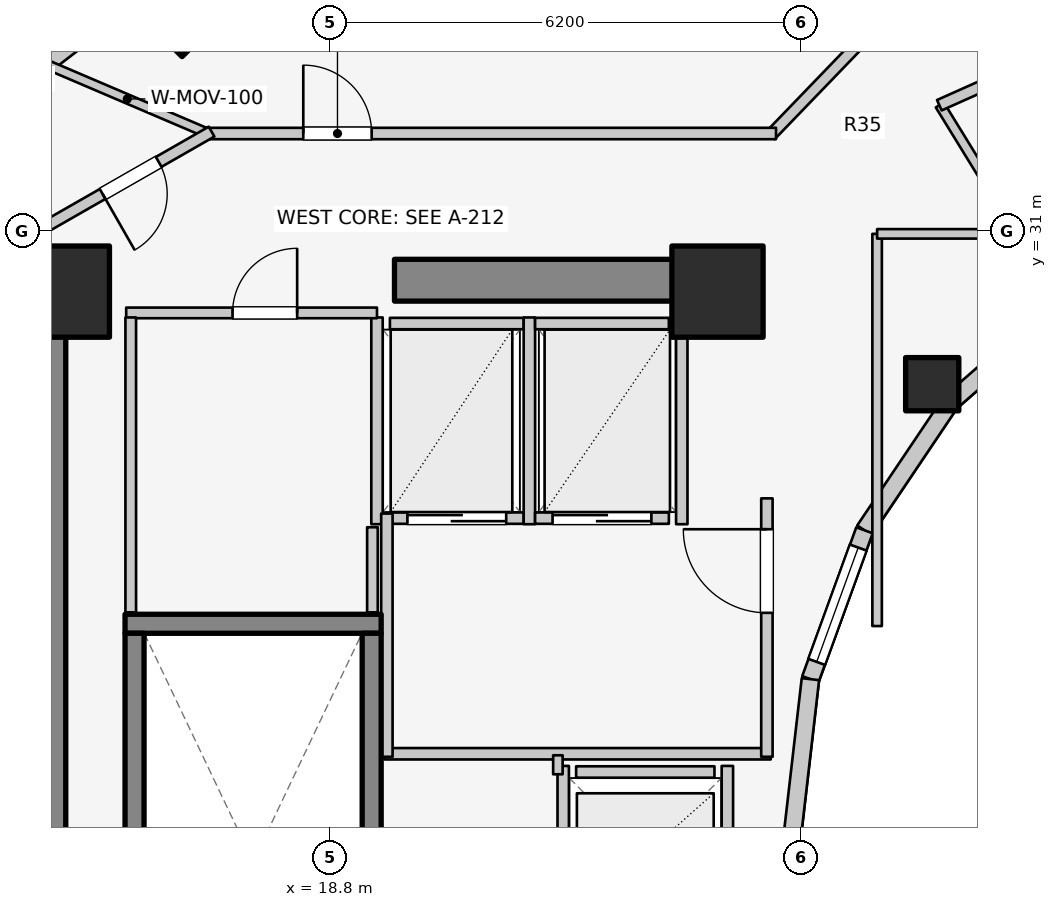
"""IFC4 building model, lengths in metres.
Left out: names, types, materials, properties, quantities, classifications, styles, units other than length and angle.
Written with IfcOpenShell. Run it as: python <this file> out.ifc"""

import sys

from ifc_helpers import new_model, si_unit, direction, frame, frame_2d, origin, origin_2d, place, context, subcontext, project, spatial, rectangle, extrude, element, fill, save


model = new_model("IFC4")
c1 = context("Model", 3, precision=1e-05, world=origin(), true_north=direction((0.0, 1.0)))
c2 = subcontext(c1, "Body", "Model", "MODEL_VIEW")
j1 = project(units=[si_unit("LENGTHUNIT", "METRE"), si_unit("PLANEANGLEUNIT", "RADIAN")], contexts=[c1])
p1 = place(None, origin())
s1 = spatial("IfcSite", under=j1, at=p1, CompositionType="ELEMENT")
p2 = place(p1, origin())
s2 = spatial("IfcBuilding", under=s1, at=p2, CompositionType="ELEMENT")
p3 = place(p2, frame((0.0, 0.0, 210.9)))
s3 = spatial("IfcBuildingStorey", under=s2, at=p3, CompositionType="ELEMENT", Elevation=210.9)
p4 = place(p3, frame((15.05, 17.05, 0.0), z_axis=(0.0, 0.0, 1.0), x_axis=(0.0, 1.0, 0.0)))
e1 = element("IfcWall", 1, at=p4, inside=s3, PredefinedType="SHEAR", context=c2, shape_type="SweptSolid", body=[
    extrude(rectangle(XDim=12.8, YDim=0.55, at=frame_2d((6.4, 0.0))), origin(), (0.0, 0.0, 1.0), 3.1),
])
p5 = place(p3, frame((19.65, 30.35, 0.0), z_axis=(0.0, 0.0, 1.0), x_axis=(1.0, 0.0, 0.0)))
e2 = element("IfcWall", 2, at=p5, inside=s3, PredefinedType="SHEAR", context=c2, shape_type="SweptSolid", body=[
    extrude(rectangle(XDim=4.5, YDim=0.55, at=frame_2d((2.25, 0.0))), origin(), (0.0, 0.0, 1.0), 3.1),
])
p6 = place(p3, frame((16.105, 25.83, 0.0), z_axis=(0.0, 0.0, 1.0), x_axis=(1.0, 0.0, 0.0)))
e3 = element("IfcWall", 3, at=p6, inside=s3, PredefinedType="SOLIDWALL", context=c2, shape_type="SweptSolid", body=[
    extrude(rectangle(XDim=3.37, YDim=0.25, at=frame_2d((1.685, 0.0))), origin(), (0.0, 0.0, 1.0), 3.1),
])
for number, where, z_axis, x_axis in (
    (4, (16.23, 17.895, 0.0), (0.0, 0.0, 1.0), (0.0, 1.0, 0.0)),
    (5, (19.35, 17.895, 0.0), (0.0, 0.0, 1.0), (0.0, 1.0, 0.0)),
):
    element("IfcWall", number, at=place(p3, frame(where, z_axis=z_axis, x_axis=x_axis)), inside=s3, PredefinedType="SOLIDWALL", context=c2, shape_type="SweptSolid", body=[
        extrude(rectangle(XDim=7.81, YDim=0.25, at=frame_2d((3.905, 0.0))), origin(), (0.0, 0.0, 1.0), 3.1),
    ])
for number, where, z_axis, x_axis in (
    (6, (23.9, 30.2, 0.0), (0.0, 0.0, 1.0), (1.0, 0.0, 0.0)),
    (7, (15.3, 30.2, 0.0), (0.0, 0.0, 1.0), (1.0, 0.0, 0.0)),
):
    element("IfcColumn", number, at=place(p3, frame(where, z_axis=z_axis, x_axis=x_axis)), inside=s3, PredefinedType="COLUMN", context=c2, shape_type="SweptSolid", body=[
        extrude(rectangle(XDim=1.2, YDim=1.2, at=origin_2d()), origin(), (0.0, 0.0, 1.0), 3.1),
    ])
p7 = place(p3, frame((26.725, 28.982, 0.0), z_axis=(0.0, 0.0, 1.0), x_axis=(1.0, 0.0, 0.0)))
e8 = element("IfcColumn", 8, at=p7, inside=s3, PredefinedType="COLUMN", context=c2, shape_type="SweptSolid", body=[
    extrude(rectangle(XDim=0.7, YDim=0.7, at=origin_2d()), origin(), (0.0, 0.0, 1.0), 3.1),
])
p8 = place(p3, frame((16.855, 33.857, 0.0), z_axis=(0.0, 0.0, 1.0), x_axis=(-0.707106781187, 0.707106781187, 0.0)))
e9 = element("IfcColumn", 9, at=p8, inside=s3, PredefinedType="COLUMN", context=c2, shape_type="SweptSolid", body=[
    extrude(rectangle(XDim=0.8, YDim=0.8, at=origin_2d()), origin(), (0.0, 0.0, 1.0), 3.1),
])
p9 = place(p3, frame((28.44, 30.032, 0.0), z_axis=(0.0, 0.0, 1.0), x_axis=(-0.752576694707, -0.658504607869, 0.0)))
e10 = element("IfcWall", 10, at=p9, inside=s3, PredefinedType="STANDARD", context=c2, shape_type="SweptSolid", body=[
    extrude(rectangle(XDim=1.959, YDim=0.23, at=frame_2d((0.98, 0.0))), origin(), (0.0, 0.0, 1.0), 2.16),
])
p10 = place(p3, frame((26.965, 28.742, 0.0), z_axis=(0.0, 0.0, 1.0), x_axis=(-0.558197800898, -0.829707909492, 0.0)))
e11 = element("IfcWall", 11, at=p10, inside=s3, PredefinedType="STANDARD", context=c2, shape_type="SweptSolid", body=[
    extrude(rectangle(XDim=2.027, YDim=0.23, at=frame_2d((1.013, 0.0))), origin(), (0.0, 0.0, 1.0), 2.16),
])
p11 = place(p3, frame((25.834, 27.06, 0.0), z_axis=(0.0, 0.0, 1.0), x_axis=(-0.341423187295, -0.93990968033, 0.0)))
e12 = element("IfcWall", 12, at=p11, inside=s3, PredefinedType="STANDARD", context=c2, shape_type="SweptSolid", body=[
    extrude(rectangle(XDim=2.084, YDim=0.23, at=frame_2d((1.042, 0.0))), origin(), (0.0, 0.0, 1.0), 2.84),
])
p12 = place(p11, frame((0.242, 0.0, 0.85)))
e13 = element("IfcOpeningElement", 13, at=p12, cuts=e12, PredefinedType="OPENING", context=c2, shape_type="SweptSolid", body=[
    extrude(rectangle(XDim=1.6, YDim=1.65, at=frame_2d((0.8, 0.825))), frame((0.0, 0.125, 0.0), z_axis=(0.0, -1.0, 0.0), x_axis=(1.0, 0.0, 0.0)), (0.0, 0.0, 1.0), 0.25),
])
p13 = place(p3, frame((25.123, 25.102, 0.0), z_axis=(0.0, 0.0, 1.0), x_axis=(-0.114711713601, -0.993398823617, 0.0)))
e14 = element("IfcWall", 14, at=p13, inside=s3, PredefinedType="STANDARD", context=c2, shape_type="SweptSolid", body=[
    extrude(rectangle(XDim=2.115, YDim=0.23, at=frame_2d((1.058, 0.0))), origin(), (0.0, 0.0, 1.0), 2.84),
])
p14 = place(p3, frame((16.442, 34.272, 0.0), z_axis=(0.0, 0.0, 1.0), x_axis=(-0.792713817907, -0.609593965603, 0.0)))
e15 = element("IfcWall", 15, at=p14, inside=s3, PredefinedType="STANDARD", context=c2, shape_type="SweptSolid", body=[
    extrude(rectangle(XDim=4.041, YDim=0.26, at=frame_2d((2.021, 0.0))), origin(), (0.0, 0.0, 1.0), 2.85),
])
p15 = place(p14, frame((2.275, 0.0, 0.75)))
e16 = element("IfcOpeningElement", 16, at=p15, cuts=e15, PredefinedType="OPENING", context=c2, shape_type="SweptSolid", body=[
    extrude(rectangle(XDim=1.2, YDim=1.5, at=frame_2d((0.6, 0.75))), frame((0.0, 0.14, 0.0), z_axis=(0.0, -1.0, 0.0), x_axis=(1.0, 0.0, 0.0)), (0.0, 0.0, 1.0), 0.28),
])
p16 = place(p3, frame((22.04, 23.88, 0.0), z_axis=(0.0, 0.0, 1.0), x_axis=(1.0, 0.0, 0.0)))
e17 = element("IfcWall", 17, at=p16, inside=s3, PredefinedType="SOLIDWALL", context=c2, shape_type="SweptSolid", body=[
    extrude(rectangle(XDim=1.82, YDim=0.15, at=frame_2d((0.91, 0.0))), origin(), (0.0, 0.0, 1.0), 2.12),
])
p17 = place(p3, frame((21.87, 21.64, 0.0), z_axis=(0.0, 0.0, 1.0), x_axis=(0.0, 1.0, 0.0)))
e18 = element("IfcWall", 18, at=p17, inside=s3, PredefinedType="SOLIDWALL", context=c2, shape_type="SweptSolid", body=[
    extrude(rectangle(XDim=2.32, YDim=0.15, at=frame_2d((1.16, 0.0))), origin(), (0.0, 0.0, 1.0), 2.855),
])
p18 = place(p3, frame((24.03, 21.64, 0.0), z_axis=(0.0, 0.0, 1.0), x_axis=(0.0, 1.0, 0.0)))
e19 = element("IfcWall", 19, at=p18, inside=s3, PredefinedType="SOLIDWALL", context=c2, shape_type="SweptSolid", body=[
    extrude(rectangle(XDim=2.32, YDim=0.15, at=frame_2d((1.16, 0.0))), origin(), (0.0, 0.0, 1.0), 2.12),
])
p19 = place(p3, frame((19.59, 27.22, 0.0), z_axis=(0.0, 0.0, 1.0), x_axis=(1.0, 0.0, 0.0)))
e20 = element("IfcWall", 20, at=p19, inside=s3, PredefinedType="SOLIDWALL", context=c2, shape_type="SweptSolid", body=[
    extrude(rectangle(XDim=1.76, YDim=0.15, at=frame_2d((0.88, 0.0))), origin(), (0.0, 0.0, 1.0), 2.855),
])
p20 = place(p19, frame((0.23, 0.0, 0.0)))
e21 = element("IfcOpeningElement", 21, at=p20, cuts=e20, PredefinedType="OPENING", context=c2, shape_type="SweptSolid", body=[
    extrude(rectangle(XDim=1.3, YDim=2.1, at=frame_2d((0.65, 1.05))), frame((0.0, 0.085, 0.0), z_axis=(0.0, -1.0, 0.0), x_axis=(1.0, 0.0, 0.0)), (0.0, 0.0, 1.0), 0.17),
])
p21 = place(p3, frame((19.59, 29.78, 0.0), z_axis=(0.0, 0.0, 1.0), x_axis=(1.0, 0.0, 0.0)))
e22 = element("IfcWall", 22, at=p21, inside=s3, PredefinedType="SOLIDWALL", context=c2, shape_type="SweptSolid", body=[
    extrude(rectangle(XDim=1.76, YDim=0.15, at=frame_2d((0.88, 0.0))), origin(), (0.0, 0.0, 1.0), 2.855),
])
for number, where, z_axis, x_axis in (
    (23, (19.42, 27.14, 0.0), (0.0, 0.0, 1.0), (0.0, 1.0, 0.0)),
    (24, (21.425, 27.14, 0.0), (0.0, 0.0, 1.0), (0.0, 1.0, 0.0)),
):
    element("IfcWall", number, at=place(p3, frame(where, z_axis=z_axis, x_axis=x_axis)), inside=s3, PredefinedType="SOLIDWALL", context=c2, shape_type="SweptSolid", body=[
        extrude(rectangle(XDim=2.72, YDim=0.15, at=frame_2d((1.36, 0.0))), origin(), (0.0, 0.0, 1.0), 2.855),
    ])
p22 = place(p3, frame((21.5, 27.22, 0.0), z_axis=(0.0, 0.0, 1.0), x_axis=(1.0, 0.0, 0.0)))
e25 = element("IfcWall", 25, at=p22, inside=s3, PredefinedType="SOLIDWALL", context=c2, shape_type="SweptSolid", body=[
    extrude(rectangle(XDim=1.76, YDim=0.15, at=frame_2d((0.88, 0.0))), origin(), (0.0, 0.0, 1.0), 2.855),
])
p23 = place(p22, frame((0.23, 0.0, 0.0)))
e26 = element("IfcOpeningElement", 26, at=p23, cuts=e25, PredefinedType="OPENING", context=c2, shape_type="SweptSolid", body=[
    extrude(rectangle(XDim=1.3, YDim=2.1, at=frame_2d((0.65, 1.05))), frame((0.0, 0.085, 0.0), z_axis=(0.0, -1.0, 0.0), x_axis=(1.0, 0.0, 0.0)), (0.0, 0.0, 1.0), 0.17),
])
p24 = place(p3, frame((21.5, 29.78, 0.0), z_axis=(0.0, 0.0, 1.0), x_axis=(1.0, 0.0, 0.0)))
e27 = element("IfcWall", 27, at=p24, inside=s3, PredefinedType="SOLIDWALL", context=c2, shape_type="SweptSolid", body=[
    extrude(rectangle(XDim=1.76, YDim=0.15, at=frame_2d((0.88, 0.0))), origin(), (0.0, 0.0, 1.0), 2.855),
])
p25 = place(p3, frame((23.43, 27.14, 0.0), z_axis=(0.0, 0.0, 1.0), x_axis=(0.0, 1.0, 0.0)))
e28 = element("IfcWall", 28, at=p25, inside=s3, PredefinedType="SOLIDWALL", context=c2, shape_type="SweptSolid", body=[
    extrude(rectangle(XDim=2.72, YDim=0.15, at=frame_2d((1.36, 0.0))), origin(), (0.0, 0.0, 1.0), 2.855),
])
p26 = place(p3, frame((19.52, 24.12, 0.0), z_axis=(0.0, 0.0, 1.0), x_axis=(1.0, 0.0, 0.0)))
e29 = element("IfcWall", 29, at=p26, inside=s3, PredefinedType="PARTITIONING", context=c2, shape_type="SweptSolid", body=[
    extrude(rectangle(XDim=5.08, YDim=0.15, at=frame_2d((2.54, 0.0))), origin(), (0.0, 0.0, 1.0), 2.12),
])
p27 = place(p3, frame((19.55, 24.08, 0.0), z_axis=(0.0, 0.0, 1.0), x_axis=(0.0, 1.0, 0.0)))
e30 = element("IfcWall", 30, at=p27, inside=s3, PredefinedType="PARTITIONING", context=c2, shape_type="SweptSolid", body=[
    extrude(rectangle(XDim=3.2, YDim=0.15, at=frame_2d((1.6, 0.0))), origin(), (0.0, 0.0, 1.0), 2.855),
])
p28 = place(p3, frame((24.55, 24.08, 0.0), z_axis=(0.0, 0.0, 1.0), x_axis=(0.0, 1.0, 0.0)))
e31 = element("IfcWall", 31, at=p28, inside=s3, PredefinedType="PARTITIONING", context=c2, shape_type="SweptSolid", body=[
    extrude(rectangle(XDim=3.4, YDim=0.15, at=frame_2d((1.7, 0.0))), origin(), (0.0, 0.0, 1.0), 2.855),
])
p29 = place(p28, frame((1.894, 0.0, 0.0)))
e32 = element("IfcOpeningElement", 32, at=p29, cuts=e31, PredefinedType="OPENING", context=c2, shape_type="SweptSolid", body=[
    extrude(rectangle(XDim=1.1, YDim=2.1, at=frame_2d((0.55, 1.05))), frame((0.0, 0.085, 0.0), z_axis=(0.0, -1.0, 0.0), x_axis=(1.0, 0.0, 0.0)), (0.0, 0.0, 1.0), 0.17),
])
p30 = place(p3, frame((21.8, 23.85, 0.0), z_axis=(0.0, 0.0, 1.0), x_axis=(0.0, 1.0, 0.0)))
e33 = element("IfcWall", 33, at=p30, inside=s3, PredefinedType="PARTITIONING", context=c2, shape_type="SweptSolid", body=[
    extrude(rectangle(XDim=0.25, YDim=0.125, at=frame_2d((0.125, 0.0))), origin(), (0.0, 0.0, 1.0), 2.855),
])
p31 = place(p3, frame((16.12, 29.92, 0.0), z_axis=(0.0, 0.0, 1.0), x_axis=(1.0, 0.0, 0.0)))
e34 = element("IfcWall", 34, at=p31, inside=s3, PredefinedType="PLUMBINGWALL", context=c2, shape_type="SweptSolid", body=[
    extrude(rectangle(XDim=3.3, YDim=0.14, at=frame_2d((1.65, 0.0))), origin(), (0.0, 0.0, 1.0), 2.855),
])
p32 = place(p31, frame((1.399, 0.0, 0.0)))
e35 = element("IfcOpeningElement", 35, at=p32, cuts=e34, PredefinedType="OPENING", context=c2, shape_type="SweptSolid", body=[
    extrude(rectangle(XDim=0.85, YDim=2.05, at=frame_2d((0.425, 1.025))), frame((0.0, 0.08, 0.0), z_axis=(0.0, -1.0, 0.0), x_axis=(1.0, 0.0, 0.0)), (0.0, 0.0, 1.0), 0.16),
])
p33 = place(p3, frame((16.18, 25.98, 0.0), z_axis=(0.0, 0.0, 1.0), x_axis=(0.0, 1.0, 0.0)))
e36 = element("IfcWall", 36, at=p33, inside=s3, PredefinedType="PLUMBINGWALL", context=c2, shape_type="SweptSolid", body=[
    extrude(rectangle(XDim=3.88, YDim=0.14, at=frame_2d((1.94, 0.0))), origin(), (0.0, 0.0, 1.0), 2.855),
])
p34 = place(p3, frame((19.36, 25.98, 0.0), z_axis=(0.0, 0.0, 1.0), x_axis=(0.0, 1.0, 0.0)))
e37 = element("IfcWall", 37, at=p34, inside=s3, PredefinedType="PLUMBINGWALL", context=c2, shape_type="SweptSolid", body=[
    extrude(rectangle(XDim=1.12, YDim=0.14, at=frame_2d((0.56, 0.0))), origin(), (0.0, 0.0, 1.0), 2.855),
])
p35 = place(p3, frame((28.45, 30.015, 0.0), z_axis=(0.0, 0.0, 1.0), x_axis=(-0.523992004803, 0.851723182086, 0.0)))
e38 = element("IfcWall", 38, at=p35, inside=s3, PredefinedType="PARTITIONING", context=c2, shape_type="SweptSolid", body=[
    extrude(rectangle(XDim=3.101, YDim=0.125, at=frame_2d((1.551, 0.0))), origin(), (0.0, 0.0, 1.0), 2.376),
])
p36 = place(p3, frame((29.323, 33.771, 0.0), z_axis=(0.0, 0.0, 1.0), x_axis=(-0.913120130558, -0.407690602257, 0.0)))
e39 = element("IfcWall", 39, at=p36, inside=s3, PredefinedType="PARTITIONING", context=c2, shape_type="SweptSolid", body=[
    extrude(rectangle(XDim=2.743, YDim=0.15, at=frame_2d((1.371, 0.0))), origin(), (0.0, 0.0, 1.0), 2.376),
])
p37 = place(p36, frame((0.896, 0.0, 0.0)))
e40 = element("IfcOpeningElement", 40, at=p37, cuts=e39, PredefinedType="OPENING", context=c2, shape_type="SweptSolid", body=[
    extrude(rectangle(XDim=0.95, YDim=2.1, at=frame_2d((0.475, 1.05))), frame((0.0, 0.085, 0.0), z_axis=(0.0, -1.0, 0.0), x_axis=(1.0, 0.0, 0.0)), (0.0, 0.0, 1.0), 0.17),
])
p38 = place(p3, frame((26.0, 25.8, 0.0), z_axis=(0.0, 0.0, 1.0), x_axis=(0.0, 1.0, 0.0)))
e41 = element("IfcWall", 41, at=p38, inside=s3, PredefinedType="PARTITIONING", context=c2, shape_type="SweptSolid", body=[
    extrude(rectangle(XDim=5.16, YDim=0.125, at=frame_2d((2.58, 0.0))), origin(), (0.0, 0.0, 1.0), 2.232),
])
p39 = place(p3, frame((26.0, 30.96, 0.0), z_axis=(0.0, 0.0, 1.0), x_axis=(1.0, 0.0, 0.0)))
e42 = element("IfcWall", 42, at=p39, inside=s3, PredefinedType="PARTITIONING", context=c2, shape_type="SweptSolid", body=[
    extrude(rectangle(XDim=2.6, YDim=0.125, at=frame_2d((1.3, 0.0))), origin(), (0.0, 0.0, 1.0), 2.376),
])
p40 = place(p3, frame((17.246, 32.26, 0.0), z_axis=(0.0, 0.0, 1.0), x_axis=(-0.919666784939, 0.39269963672, 0.0)))
e43 = element("IfcWall", 43, at=p40, inside=s3, PredefinedType="MOVABLE", context=c2, shape_type="SweptSolid", body=[
    extrude(rectangle(XDim=2.417, YDim=0.12, at=frame_2d((1.208, 0.0))), origin(), (0.0, 0.0, 1.0), 2.22),
])
p41 = place(p3, frame((26.097, 33.812, 0.0), z_axis=(0.0, 0.0, 1.0), x_axis=(-0.694032962553, -0.719943224768, 0.0)))
e44 = element("IfcWall", 44, at=p41, inside=s3, PredefinedType="PARTITIONING", context=c2, shape_type="SweptSolid", body=[
    extrude(rectangle(XDim=2.158, YDim=0.15, at=frame_2d((1.079, 0.0))), origin(), (0.0, 0.0, 1.0), 2.376),
])
p42 = place(p3, frame((17.15, 32.28, 0.0), z_axis=(0.0, 0.0, 1.0), x_axis=(1.0, 0.0, 0.0)))
e45 = element("IfcWall", 45, at=p42, inside=s3, PredefinedType="PARTITIONING", context=c2, shape_type="SweptSolid", body=[
    extrude(rectangle(XDim=7.52, YDim=0.15, at=frame_2d((3.76, 0.0))), origin(), (0.0, 0.0, 1.0), 2.376),
])
p43 = place(p42, frame((1.3, 0.0, 0.0)))
e46 = element("IfcOpeningElement", 46, at=p43, cuts=e45, PredefinedType="OPENING", context=c2, shape_type="SweptSolid", body=[
    extrude(rectangle(XDim=0.9, YDim=2.1, at=frame_2d((0.45, 1.05))), frame((0.0, 0.085, 0.0), z_axis=(0.0, -1.0, 0.0), x_axis=(1.0, 0.0, 0.0)), (0.0, 0.0, 1.0), 0.17),
])
p44 = place(p3, frame((17.243, 32.305, 0.0), z_axis=(0.0, 0.0, 1.0), x_axis=(-0.867991349648, -0.496579315857, 0.0)))
e47 = element("IfcWall", 47, at=p44, inside=s3, PredefinedType="PARTITIONING", context=c2, shape_type="SweptSolid", body=[
    extrude(rectangle(XDim=2.567, YDim=0.15, at=frame_2d((1.283, 0.0))), origin(), (0.0, 0.0, 1.0), 2.22),
])
p45 = place(p44, frame((0.802, 0.0, 0.0)))
e48 = element("IfcOpeningElement", 48, at=p45, cuts=e47, PredefinedType="OPENING", context=c2, shape_type="SweptSolid", body=[
    extrude(rectangle(XDim=0.85, YDim=2.05, at=frame_2d((0.425, 1.025))), frame((0.0, 0.085, 0.0), z_axis=(0.0, -1.0, 0.0), x_axis=(1.0, 0.0, 0.0)), (0.0, 0.0, 1.0), 0.17),
])
p46 = place(p12, origin())
e49 = element("IfcWindow", 49, at=p46, inside=s3, PartitioningType="SINGLE_PANEL", PredefinedType="WINDOW", context=c2, shape_type="SweptSolid", body=[
    extrude(rectangle(XDim=1.6, YDim=1.65, at=frame_2d((0.8, 0.825))), frame((0.0, 0.03, 0.0), z_axis=(0.0, -1.0, 0.0), x_axis=(1.0, 0.0, 0.0)), (0.0, 0.0, 1.0), 0.06),
])
fill(e13, e49)
p47 = place(p20, origin())
e50 = element("IfcDoor", 50, at=p47, inside=s3, OperationType="DOUBLE_DOOR_SLIDING", PredefinedType="DOOR", context=c2, shape_type="SweptSolid", body=[
    extrude(rectangle(XDim=1.3, YDim=2.1, at=frame_2d((0.65, 1.05))), frame((0.0, 0.025, 0.0), z_axis=(0.0, -1.0, 0.0), x_axis=(1.0, 0.0, 0.0)), (0.0, 0.0, 1.0), 0.05),
])
fill(e21, e50)
p48 = place(p23, origin())
e51 = element("IfcDoor", 51, at=p48, inside=s3, OperationType="DOUBLE_DOOR_SLIDING", PredefinedType="DOOR", context=c2, shape_type="SweptSolid", body=[
    extrude(rectangle(XDim=1.3, YDim=2.1, at=frame_2d((0.65, 1.05))), frame((0.0, 0.025, 0.0), z_axis=(0.0, -1.0, 0.0), x_axis=(1.0, 0.0, 0.0)), (0.0, 0.0, 1.0), 0.05),
])
fill(e26, e51)
p49 = place(p29, origin())
e52 = element("IfcDoor", 52, at=p49, inside=s3, OperationType="SINGLE_SWING_RIGHT", PredefinedType="DOOR", context=c2, shape_type="SweptSolid", body=[
    extrude(rectangle(XDim=1.1, YDim=2.1, at=frame_2d((0.55, 1.05))), frame((0.0, 0.025, 0.0), z_axis=(0.0, -1.0, 0.0), x_axis=(1.0, 0.0, 0.0)), (0.0, 0.0, 1.0), 0.05),
])
fill(e32, e52)
p50 = place(p32, origin())
e53 = element("IfcDoor", 53, at=p50, inside=s3, OperationType="SINGLE_SWING_RIGHT", PredefinedType="DOOR", context=c2, shape_type="SweptSolid", body=[
    extrude(rectangle(XDim=0.85, YDim=2.05, at=frame_2d((0.425, 1.025))), frame((0.0, 0.025, 0.0), z_axis=(0.0, -1.0, 0.0), x_axis=(1.0, 0.0, 0.0)), (0.0, 0.0, 1.0), 0.05),
])
fill(e35, e53)
p51 = place(p43, origin())
e54 = element("IfcDoor", 54, at=p51, inside=s3, OperationType="SINGLE_SWING_LEFT", PredefinedType="DOOR", context=c2, shape_type="SweptSolid", body=[
    extrude(rectangle(XDim=0.9, YDim=2.1, at=frame_2d((0.45, 1.05))), frame((0.0, 0.025, 0.0), z_axis=(0.0, -1.0, 0.0), x_axis=(1.0, 0.0, 0.0)), (0.0, 0.0, 1.0), 0.05),
])
fill(e46, e54)
p52 = place(p45, origin())
e55 = element("IfcDoor", 55, at=p52, inside=s3, OperationType="SINGLE_SWING_RIGHT", PredefinedType="DOOR", context=c2, shape_type="SweptSolid", body=[
    extrude(rectangle(XDim=0.85, YDim=2.05, at=frame_2d((0.425, 1.025))), frame((0.0, 0.025, 0.0), z_axis=(0.0, -1.0, 0.0), x_axis=(1.0, 0.0, 0.0)), (0.0, 0.0, 1.0), 0.05),
])
fill(e48, e55)
save(model, sys.argv[1])
